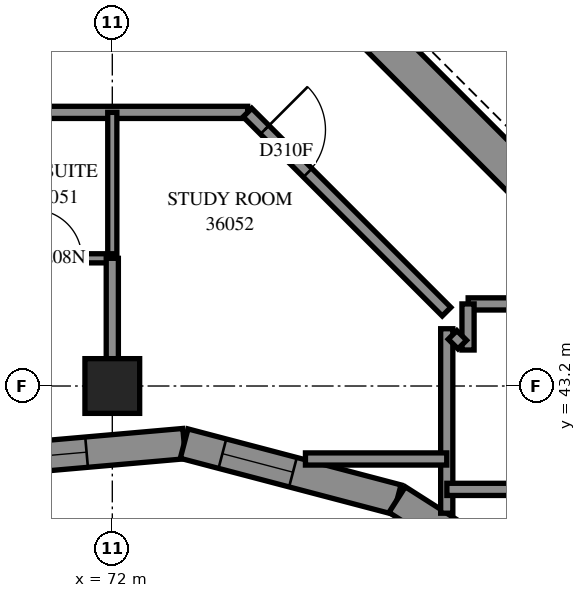
"""IFC4 building model, lengths in metres.
Left out: names, types, materials, properties, quantities, classifications, styles, units other than length and angle.
Written with IfcOpenShell. Run it as: python <this file> out.ifc"""

import sys

from ifc_helpers import new_model, si_unit, direction, frame, frame_2d, origin, origin_2d, place, context, subcontext, project, spatial, polyline, rectangle, outline, extrude, element, fill, save


model = new_model("IFC4")
c1 = context("Model", 3, precision=1e-05, world=origin(), true_north=direction((0.0, 1.0)))
c2 = subcontext(c1, "Body", "Model", "MODEL_VIEW")
j1 = project(units=[si_unit("LENGTHUNIT", "METRE"), si_unit("PLANEANGLEUNIT", "RADIAN")], contexts=[c1])
p1 = place(None, origin())
s1 = spatial("IfcSite", under=j1, at=p1, CompositionType="ELEMENT")
p2 = place(p1, origin())
s2 = spatial("IfcBuilding", under=s1, at=p2, CompositionType="ELEMENT")
p3 = place(p2, frame((0.0, 0.0, 135.4)))
s3 = spatial("IfcBuildingStorey", under=s2, at=p3, CompositionType="ELEMENT", Elevation=135.4)
p4 = place(p3, frame((72.0, 43.2, 0.0), z_axis=(0.0, 0.0, 1.0), x_axis=(1.0, 0.0, 0.0)))
e1 = element("IfcColumn", 1, at=p4, inside=s3, PredefinedType="COLUMN", context=c2, shape_type="SweptSolid", body=[
    extrude(rectangle(XDim=0.9, YDim=0.9, at=origin_2d()), origin(), (0.0, 0.0, 1.0), 3.1),
])
p5 = place(p3, frame((76.018, 49.302, -0.3), z_axis=(0.0, 0.0, 1.0), x_axis=(0.7071067812, -0.7071067812, 0.0)))
e2 = element("IfcWall", 2, at=p5, inside=s3, PredefinedType="SHEAR", context=c2, shape_type="SweptSolid", body=[
    extrude(rectangle(XDim=15.6, YDim=0.6, at=frame_2d((7.8, 0.0))), origin(), (0.0, 0.0, 1.0), 2.7),
])
p6 = place(p3, frame((69.737, 41.951, 0.0), z_axis=(0.0, 0.0, 1.0), x_axis=(0.9961832879, 0.0872860633, 0.0)))
e3 = element("IfcWall", 3, at=p6, inside=s3, PredefinedType="SOLIDWALL", context=c2, shape_type="SweptSolid", body=[
    extrude(outline(polyline([(-0.022, -0.25), (3.414, -0.25), (3.501, 0.25), (0.022, 0.25), (-0.022, -0.25)])), origin(), (0.0, 0.0, 1.0), 3.1),
])
p7 = place(p6, frame((0.647, 0.0, 0.45)))
e4 = element("IfcOpeningElement", 4, at=p7, cuts=e3, PredefinedType="OPENING", context=c2, shape_type="SweptSolid", body=[
    extrude(rectangle(XDim=1.2, YDim=2.5, at=frame_2d((0.6, 1.25))), frame((0.0, 0.26, 0.0), z_axis=(0.0, -1.0, 0.0), x_axis=(1.0, 0.0, 0.0)), (0.0, 0.0, 1.0), 0.52),
])
p8 = place(p3, frame((73.182, 42.253, 0.0), z_axis=(0.0, 0.0, 1.0), x_axis=(0.9671281624, -0.2542894363, 0.0)))
e5 = element("IfcWall", 5, at=p8, inside=s3, PredefinedType="SOLIDWALL", context=c2, shape_type="SweptSolid", body=[
    extrude(outline(polyline([(0.043, -0.25), (3.583, -0.25), (3.661, 0.25), (-0.043, 0.25), (0.043, -0.25)])), origin(), (0.0, 0.0, 1.0), 3.1),
])
p9 = place(p8, frame((0.65, 0.0, 0.45)))
e6 = element("IfcOpeningElement", 6, at=p9, cuts=e5, PredefinedType="OPENING", context=c2, shape_type="SweptSolid", body=[
    extrude(rectangle(XDim=1.2, YDim=2.5, at=frame_2d((0.6, 1.25))), frame((0.0, 0.26, 0.0), z_axis=(0.0, -1.0, 0.0), x_axis=(1.0, 0.0, 0.0)), (0.0, 0.0, 1.0), 0.52),
])
p10 = place(p3, frame((76.684, 41.332, 0.0), z_axis=(0.0, 0.0, 1.0), x_axis=(0.8431951323, -0.5376076347, 0.0)))
e7 = element("IfcWall", 7, at=p10, inside=s3, PredefinedType="SOLIDWALL", context=c2, shape_type="SweptSolid", body=[
    extrude(outline(polyline([(0.039, -0.25), (4.204, -0.25), (4.278, 0.25), (-0.039, 0.25), (0.039, -0.25)])), origin(), (0.0, 0.0, 1.0), 3.1),
])
p11 = place(p10, frame((0.917, 0.0, 0.45)))
e8 = element("IfcOpeningElement", 8, at=p11, cuts=e7, PredefinedType="OPENING", context=c2, shape_type="SweptSolid", body=[
    extrude(rectangle(XDim=1.2, YDim=2.5, at=frame_2d((0.6, 1.25))), frame((0.0, 0.26, 0.0), z_axis=(0.0, -1.0, 0.0), x_axis=(1.0, 0.0, 0.0)), (0.0, 0.0, 1.0), 0.52),
])
p12 = place(p10, frame((2.288, 0.0, 0.45)))
e9 = element("IfcOpeningElement", 9, at=p12, cuts=e7, PredefinedType="OPENING", context=c2, shape_type="SweptSolid", body=[
    extrude(rectangle(XDim=1.2, YDim=2.5, at=frame_2d((0.6, 1.25))), frame((0.0, 0.26, 0.0), z_axis=(0.0, -1.0, 0.0), x_axis=(1.0, 0.0, 0.0)), (0.0, 0.0, 1.0), 0.52),
])
p13 = place(p3, frame((54.9, 47.7, 0.0), z_axis=(0.0, 0.0, 1.0), x_axis=(1.0, 0.0, 0.0)))
e10 = element("IfcWall", 10, at=p13, inside=s3, PredefinedType="PARTITIONING", context=c2, shape_type="SweptSolid", body=[
    extrude(rectangle(XDim=19.326, YDim=0.2, at=frame_2d((9.663, 0.0))), origin(), (0.0, 0.0, 1.0), 3.1),
])
p14 = place(p13, frame((5.0, 0.0, 0.0)))
e11 = element("IfcOpeningElement", 11, at=p14, cuts=e10, PredefinedType="OPENING", context=c2, shape_type="SweptSolid", body=[
    extrude(rectangle(XDim=0.9, YDim=2.1, at=frame_2d((0.45, 1.05))), frame((0.0, 0.11, 0.0), z_axis=(0.0, -1.0, 0.0), x_axis=(1.0, 0.0, 0.0)), (0.0, 0.0, 1.0), 0.22),
])
p15 = place(p13, frame((12.2, 0.0, 0.0)))
e12 = element("IfcOpeningElement", 12, at=p15, cuts=e10, PredefinedType="OPENING", context=c2, shape_type="SweptSolid", body=[
    extrude(rectangle(XDim=0.9, YDim=2.1, at=frame_2d((0.45, 1.05))), frame((0.0, 0.11, 0.0), z_axis=(0.0, -1.0, 0.0), x_axis=(1.0, 0.0, 0.0)), (0.0, 0.0, 1.0), 0.22),
])
p16 = place(p13, frame((6.7, 0.0, 0.0)))
e13 = element("IfcOpeningElement", 13, at=p16, cuts=e10, PredefinedType="OPENING", context=c2, shape_type="SweptSolid", body=[
    extrude(rectangle(XDim=0.9, YDim=2.1, at=frame_2d((0.45, 1.05))), frame((0.0, 0.11, 0.0), z_axis=(0.0, -1.0, 0.0), x_axis=(1.0, 0.0, 0.0)), (0.0, 0.0, 1.0), 0.22),
])
p17 = place(p13, frame((13.9, 0.0, 0.0)))
e14 = element("IfcOpeningElement", 14, at=p17, cuts=e10, PredefinedType="OPENING", context=c2, shape_type="SweptSolid", body=[
    extrude(rectangle(XDim=0.9, YDim=2.1, at=frame_2d((0.45, 1.05))), frame((0.0, 0.11, 0.0), z_axis=(0.0, -1.0, 0.0), x_axis=(1.0, 0.0, 0.0)), (0.0, 0.0, 1.0), 0.22),
])
p18 = place(p3, frame((74.223, 47.697, 0.0), z_axis=(0.0, 0.0, 1.0), x_axis=(0.7071067812, -0.7071067812, 0.0)))
e15 = element("IfcWall", 15, at=p18, inside=s3, PredefinedType="PARTITIONING", context=c2, shape_type="SweptSolid", body=[
    extrude(rectangle(XDim=4.63, YDim=0.2, at=frame_2d((2.315, 0.0))), origin(), (0.0, 0.0, 1.0), 3.1),
])
p19 = place(p18, frame((0.401, 0.0, 0.0)))
e16 = element("IfcOpeningElement", 16, at=p19, cuts=e15, PredefinedType="OPENING", context=c2, shape_type="SweptSolid", body=[
    extrude(rectangle(XDim=1.0, YDim=2.1, at=frame_2d((0.5, 1.05))), frame((0.0, 0.11, 0.0), z_axis=(0.0, -1.0, 0.0), x_axis=(1.0, 0.0, 0.0)), (0.0, 0.0, 1.0), 0.22),
])
p20 = place(p3, frame((77.5, 41.108, 0.0), z_axis=(0.0, 0.0, 1.0), x_axis=(0.0, 1.0, 0.0)))
e17 = element("IfcWall", 17, at=p20, inside=s3, PredefinedType="PARTITIONING", context=c2, shape_type="SweptSolid", body=[
    extrude(rectangle(XDim=3.034, YDim=0.2, at=frame_2d((1.517, 0.0))), origin(), (0.0, 0.0, 1.0), 3.1),
])
p21 = place(p3, frame((77.502, 41.5, 0.0), z_axis=(0.0, 0.0, 1.0), x_axis=(1.0, 0.0, 0.0)))
e18 = element("IfcWall", 18, at=p21, inside=s3, PredefinedType="PARTITIONING", context=c2, shape_type="SweptSolid", body=[
    extrude(rectangle(XDim=2.64, YDim=0.2, at=frame_2d((1.32, 0.0))), origin(), (0.0, 0.0, 1.0), 3.1),
])
p22 = place(p3, frame((72.0, 45.3, 0.0), z_axis=(0.0, 0.0, 1.0), x_axis=(0.0, 1.0, 0.0)))
e19 = element("IfcWall", 19, at=p22, inside=s3, PredefinedType="PARTITIONING", context=c2, shape_type="SweptSolid", body=[
    extrude(rectangle(XDim=2.4, YDim=0.15, at=frame_2d((1.2, 0.0))), origin(), (0.0, 0.0, 1.0), 3.1),
])
p23 = place(p3, frame((77.852, 44.55, 0.0), z_axis=(0.0, 0.0, 1.0), x_axis=(1.0, 0.0, 0.0)))
e20 = element("IfcWall", 20, at=p23, inside=s3, PredefinedType="PARTITIONING", context=c2, shape_type="SweptSolid", body=[
    extrude(rectangle(XDim=2.38, YDim=0.2, at=frame_2d((1.19, 0.0))), origin(), (0.0, 0.0, 1.0), 3.1),
])
p24 = place(p3, frame((75.177, 42.0, 0.0), z_axis=(0.0, 0.0, 1.0), x_axis=(1.0, 0.0, 0.0)))
e21 = element("IfcWall", 21, at=p24, inside=s3, PredefinedType="PARTITIONING", context=c2, shape_type="SweptSolid", body=[
    extrude(rectangle(XDim=2.324, YDim=0.2, at=frame_2d((1.162, 0.0))), origin(), (0.0, 0.0, 1.0), 3.1),
])
p25 = place(p3, frame((70.1, 45.3, 0.0), z_axis=(0.0, 0.0, 1.0), x_axis=(1.0, 0.0, 0.0)))
e22 = element("IfcWall", 22, at=p25, inside=s3, PredefinedType="PARTITIONING", context=c2, shape_type="SweptSolid", body=[
    extrude(rectangle(XDim=1.9, YDim=0.15, at=frame_2d((0.95, 0.0))), origin(), (0.0, 0.0, 1.0), 3.1),
])
p26 = place(p25, frame((0.598, 0.0, 0.0)))
e23 = element("IfcOpeningElement", 23, at=p26, cuts=e22, PredefinedType="OPENING", context=c2, shape_type="SweptSolid", body=[
    extrude(rectangle(XDim=0.8, YDim=2.1, at=frame_2d((0.4, 1.05))), frame((0.0, 0.085, 0.0), z_axis=(0.0, -1.0, 0.0), x_axis=(1.0, 0.0, 0.0)), (0.0, 0.0, 1.0), 0.17),
])
p27 = place(p3, frame((72.0, 43.65, 0.0), z_axis=(0.0, 0.0, 1.0), x_axis=(0.0, 1.0, 0.0)))
e24 = element("IfcWall", 24, at=p27, inside=s3, PredefinedType="PARTITIONING", context=c2, shape_type="SweptSolid", body=[
    extrude(rectangle(XDim=1.65, YDim=0.2, at=frame_2d((0.825, 0.0))), origin(), (0.0, 0.0, 1.0), 3.1),
])
p28 = place(p3, frame((77.85, 43.792, 0.0), z_axis=(0.0, 0.0, 1.0), x_axis=(0.0, 1.0, 0.0)))
e25 = element("IfcWall", 25, at=p28, inside=s3, PredefinedType="PARTITIONING", context=c2, shape_type="SweptSolid", body=[
    extrude(rectangle(XDim=0.758, YDim=0.2, at=frame_2d((0.379, 0.0))), origin(), (0.0, 0.0, 1.0), 3.1),
])
p29 = place(p3, frame((77.596, 44.04, 0.0), z_axis=(0.0, 0.0, 1.0), x_axis=(0.7071067812, -0.7071067812, 0.0)))
e26 = element("IfcWall", 26, at=p29, inside=s3, PredefinedType="PARTITIONING", context=c2, shape_type="SweptSolid", body=[
    extrude(rectangle(XDim=0.225, YDim=0.2, at=frame_2d((0.113, 0.0))), origin(), (0.0, 0.0, 1.0), 3.1),
])
p30 = place(p7, origin())
e27 = element("IfcWindow", 27, at=p30, inside=s3, PartitioningType="SINGLE_PANEL", PredefinedType="WINDOW", context=c2, shape_type="SweptSolid", body=[
    extrude(rectangle(XDim=1.2, YDim=2.5, at=frame_2d((0.6, 1.25))), frame((0.0, 0.18, 0.0), z_axis=(0.0, -1.0, 0.0), x_axis=(1.0, 0.0, 0.0)), (0.0, 0.0, 1.0), 0.06),
])
fill(e4, e27)
p31 = place(p9, origin())
e28 = element("IfcWindow", 28, at=p31, inside=s3, PartitioningType="SINGLE_PANEL", PredefinedType="WINDOW", context=c2, shape_type="SweptSolid", body=[
    extrude(rectangle(XDim=1.2, YDim=2.5, at=frame_2d((0.6, 1.25))), frame((0.0, 0.18, 0.0), z_axis=(0.0, -1.0, 0.0), x_axis=(1.0, 0.0, 0.0)), (0.0, 0.0, 1.0), 0.06),
])
fill(e6, e28)
p32 = place(p26, origin())
e29 = element("IfcDoor", 29, at=p32, inside=s3, OperationType="SINGLE_SWING_RIGHT", PredefinedType="DOOR", context=c2, shape_type="SweptSolid", body=[
    extrude(rectangle(XDim=0.8, YDim=2.1, at=frame_2d((0.4, 1.05))), frame((0.0, 0.025, 0.0), z_axis=(0.0, -1.0, 0.0), x_axis=(1.0, 0.0, 0.0)), (0.0, 0.0, 1.0), 0.05),
])
fill(e23, e29)
p33 = place(p19, origin())
e30 = element("IfcDoor", 30, at=p33, inside=s3, OperationType="SINGLE_SWING_LEFT", PredefinedType="DOOR", context=c2, shape_type="SweptSolid", body=[
    extrude(rectangle(XDim=1.0, YDim=2.1, at=frame_2d((0.5, 1.05))), frame((0.0, 0.025, 0.0), z_axis=(0.0, -1.0, 0.0), x_axis=(1.0, 0.0, 0.0)), (0.0, 0.0, 1.0), 0.05),
])
fill(e16, e30)
save(model, sys.argv[1])
